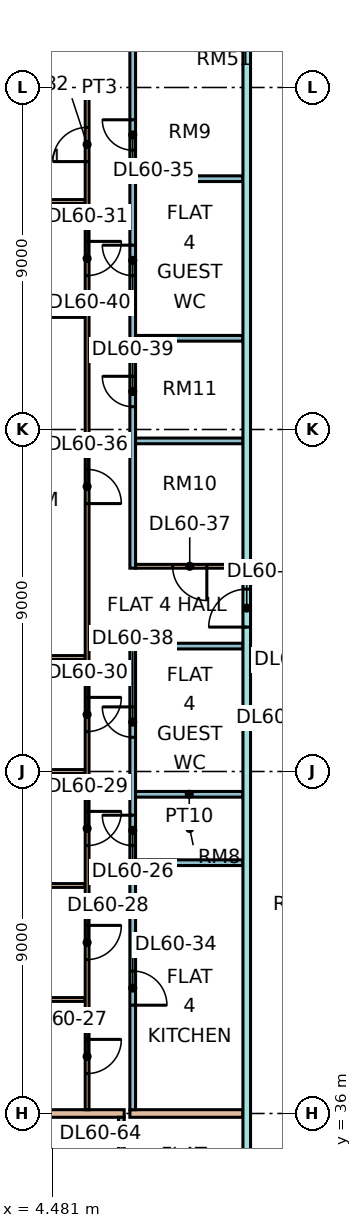
"""IFC4 building model, lengths in metres.
Left out: names, types, materials, properties, quantities, classifications, styles, units other than length and angle.
Written with IfcOpenShell. Run it as: python <this file> out.ifc"""

import sys

from ifc_helpers import new_model, si_unit, direction, frame, frame_2d, origin, place, context, subcontext, project, spatial, rectangle, extrude, element, fill, save


model = new_model("IFC4")
c1 = context("Model", 3, precision=1e-05, world=origin(), true_north=direction((0.0, 1.0)))
c2 = subcontext(c1, "Body", "Model", "MODEL_VIEW")
j1 = project(units=[si_unit("LENGTHUNIT", "METRE"), si_unit("PLANEANGLEUNIT", "RADIAN")], contexts=[c1])
p1 = place(None, origin())
s1 = spatial("IfcSite", under=j1, at=p1, CompositionType="ELEMENT")
p2 = place(p1, origin())
s2 = spatial("IfcBuilding", under=s1, at=p2, CompositionType="ELEMENT")
p3 = place(p2, frame((0.0, 0.0, 252.9)))
s3 = spatial("IfcBuildingStorey", under=s2, at=p3, CompositionType="ELEMENT", Elevation=252.9)
p4 = place(p3, frame((-1.351, 60.0, 0.0), z_axis=(0.0, 0.0, 1.0), x_axis=(1.0, 0.0, 0.0)))
e1 = element("IfcWall", 1, at=p4, inside=s3, PredefinedType="PARTITIONING", context=c2, shape_type="SweptSolid", body=[
    extrude(rectangle(XDim=6.701, YDim=0.1, at=frame_2d((3.351, 0.0))), origin(), (0.0, 0.0, 1.0), 3.3),
])
p5 = place(p3, frame((0.0, 36.0, 0.0), z_axis=(0.0, 0.0, 1.0), x_axis=(1.0, 0.0, 0.0)))
e2 = element("IfcWall", 2, at=p5, inside=s3, PredefinedType="PARTITIONING", context=c2, shape_type="SweptSolid", body=[
    extrude(rectangle(XDim=6.375, YDim=0.2, at=frame_2d((3.188, 0.0))), origin(), (0.0, 0.0, 1.0), 3.3),
])
p6 = place(p3, frame((0.0, 48.0, 0.0), z_axis=(0.0, 0.0, 1.0), x_axis=(1.0, 0.0, 0.0)))
e3 = element("IfcWall", 3, at=p6, inside=s3, PredefinedType="PARTITIONING", context=c2, shape_type="SweptSolid", body=[
    extrude(rectangle(XDim=5.35, YDim=0.1, at=frame_2d((2.675, 0.0))), origin(), (0.0, 0.0, 1.0), 3.3),
])
p7 = place(p3, frame((-1.35, 57.0, 0.0), z_axis=(0.0, 0.0, 1.0), x_axis=(1.0, 0.0, 0.0)))
e4 = element("IfcWall", 4, at=p7, inside=s3, PredefinedType="PARTITIONING", context=c2, shape_type="SweptSolid", body=[
    extrude(rectangle(XDim=6.7, YDim=0.1, at=frame_2d((3.35, 0.0))), origin(), (0.0, 0.0, 1.0), 3.3),
])
for number, where, z_axis, x_axis in (
    (5, (0.074, 39.0, 0.0), (0.0, 0.0, 1.0), (1.0, 0.0, 0.0)),
    (6, (0.074, 42.0, 0.0), (0.0, 0.0, 1.0), (1.0, 0.0, 0.0)),
    (7, (0.074, 45.0, 0.0), (0.0, 0.0, 1.0), (1.0, 0.0, 0.0)),
):
    element("IfcWall", number, at=place(p3, frame(where, z_axis=z_axis, x_axis=x_axis)), inside=s3, PredefinedType="PARTITIONING", context=c2, shape_type="SweptSolid", body=[
        extrude(rectangle(XDim=5.276, YDim=0.1, at=frame_2d((2.638, 0.0))), origin(), (0.0, 0.0, 1.0), 3.3),
    ])
p8 = place(p3, frame((5.4, 36.1, 0.0), z_axis=(0.0, 0.0, 1.0), x_axis=(0.0, 1.0, 0.0)))
e8 = element("IfcWall", 8, at=p8, inside=s3, PredefinedType="PARTITIONING", context=c2, shape_type="SweptSolid", body=[
    extrude(rectangle(XDim=26.95, YDim=0.1, at=frame_2d((13.475, 0.0))), origin(), (0.0, 0.0, 1.0), 3.3),
])
p9 = place(p8, frame((0.95, 0.0, 0.0)))
e9 = element("IfcOpeningElement", 9, at=p9, cuts=e8, PredefinedType="OPENING", context=c2, shape_type="SweptSolid", body=[
    extrude(rectangle(XDim=0.9, YDim=2.1, at=frame_2d((0.45, 1.05))), frame((0.0, 0.06, 0.0), z_axis=(0.0, -1.0, 0.0), x_axis=(1.0, 0.0, 0.0)), (0.0, 0.0, 1.0), 0.12),
])
p10 = place(p8, frame((3.95, 0.0, 0.0)))
e10 = element("IfcOpeningElement", 10, at=p10, cuts=e8, PredefinedType="OPENING", context=c2, shape_type="SweptSolid", body=[
    extrude(rectangle(XDim=0.9, YDim=2.1, at=frame_2d((0.45, 1.05))), frame((0.0, 0.06, 0.0), z_axis=(0.0, -1.0, 0.0), x_axis=(1.0, 0.0, 0.0)), (0.0, 0.0, 1.0), 0.12),
])
p11 = place(p8, frame((6.95, 0.0, 0.0)))
e11 = element("IfcOpeningElement", 11, at=p11, cuts=e8, PredefinedType="OPENING", context=c2, shape_type="SweptSolid", body=[
    extrude(rectangle(XDim=0.9, YDim=2.1, at=frame_2d((0.45, 1.05))), frame((0.0, 0.06, 0.0), z_axis=(0.0, -1.0, 0.0), x_axis=(1.0, 0.0, 0.0)), (0.0, 0.0, 1.0), 0.12),
])
p12 = place(p8, frame((9.95, 0.0, 0.0)))
e12 = element("IfcOpeningElement", 12, at=p12, cuts=e8, PredefinedType="OPENING", context=c2, shape_type="SweptSolid", body=[
    extrude(rectangle(XDim=0.9, YDim=2.1, at=frame_2d((0.45, 1.05))), frame((0.0, 0.06, 0.0), z_axis=(0.0, -1.0, 0.0), x_axis=(1.0, 0.0, 0.0)), (0.0, 0.0, 1.0), 0.12),
])
p13 = place(p8, frame((21.95, 0.0, 0.0)))
e13 = element("IfcOpeningElement", 13, at=p13, cuts=e8, PredefinedType="OPENING", context=c2, shape_type="SweptSolid", body=[
    extrude(rectangle(XDim=0.9, YDim=2.1, at=frame_2d((0.45, 1.05))), frame((0.0, 0.06, 0.0), z_axis=(0.0, -1.0, 0.0), x_axis=(1.0, 0.0, 0.0)), (0.0, 0.0, 1.0), 0.12),
])
p14 = place(p8, frame((24.95, 0.0, 0.0)))
e14 = element("IfcOpeningElement", 14, at=p14, cuts=e8, PredefinedType="OPENING", context=c2, shape_type="SweptSolid", body=[
    extrude(rectangle(XDim=0.9, YDim=2.1, at=frame_2d((0.45, 1.05))), frame((0.0, 0.06, 0.0), z_axis=(0.0, -1.0, 0.0), x_axis=(1.0, 0.0, 0.0)), (0.0, 0.0, 1.0), 0.12),
])
p15 = place(p8, frame((15.95, 0.0, 0.0)))
e15 = element("IfcOpeningElement", 15, at=p15, cuts=e8, PredefinedType="OPENING", context=c2, shape_type="SweptSolid", body=[
    extrude(rectangle(XDim=0.9, YDim=2.1, at=frame_2d((0.45, 1.05))), frame((0.0, 0.06, 0.0), z_axis=(0.0, -1.0, 0.0), x_axis=(1.0, 0.0, 0.0)), (0.0, 0.0, 1.0), 0.12),
])
p16 = place(p3, frame((5.45, 63.0, 0.0), z_axis=(0.0, 0.0, 1.0), x_axis=(1.0, 0.0, 0.0)))
e16 = element("IfcWall", 16, at=p16, inside=s3, PredefinedType="PARTITIONING", context=c2, shape_type="SweptSolid", body=[
    extrude(rectangle(XDim=0.55, YDim=0.1, at=frame_2d((0.275, 0.0))), origin(), (0.0, 0.0, 1.0), 3.3),
])
p17 = place(p3, frame((6.3, 26.325, 0.0), z_axis=(0.0, 0.0, 1.0), x_axis=(0.0, 1.0, 0.0)))
e17 = element("IfcWall", 17, at=p17, inside=s3, PredefinedType="PARTITIONING", context=c2, shape_type="SweptSolid", body=[
    extrude(rectangle(XDim=9.575, YDim=0.15, at=frame_2d((4.788, 0.0))), origin(), (0.0, 0.0, 1.0), 3.3),
])
p18 = place(p17, frame((4.575, 0.0, 0.0)))
e18 = element("IfcOpeningElement", 18, at=p18, cuts=e17, PredefinedType="OPENING", context=c2, shape_type="SweptSolid", body=[
    extrude(rectangle(XDim=0.8, YDim=2.1, at=frame_2d((0.4, 1.05))), frame((0.0, 0.085, 0.0), z_axis=(0.0, -1.0, 0.0), x_axis=(1.0, 0.0, 0.0)), (0.0, 0.0, 1.0), 0.17),
])
p19 = place(p17, frame((7.725, 0.0, 0.0)))
e19 = element("IfcOpeningElement", 19, at=p19, cuts=e17, PredefinedType="OPENING", context=c2, shape_type="SweptSolid", body=[
    extrude(rectangle(XDim=0.9, YDim=2.1, at=frame_2d((0.45, 1.05))), frame((0.0, 0.085, 0.0), z_axis=(0.0, -1.0, 0.0), x_axis=(1.0, 0.0, 0.0)), (0.0, 0.0, 1.0), 0.17),
])
p20 = place(p3, frame((6.525, 36.0, 0.0), z_axis=(0.0, 0.0, 1.0), x_axis=(1.0, 0.0, 0.0)))
e20 = element("IfcWall", 20, at=p20, inside=s3, PredefinedType="PARTITIONING", context=c2, shape_type="SweptSolid", body=[
    extrude(rectangle(XDim=2.975, YDim=0.2, at=frame_2d((1.488, 0.0))), origin(), (0.0, 0.0, 1.0), 3.3),
])
p21 = place(p3, frame((6.6, 36.1, 0.0), z_axis=(0.0, 0.0, 1.0), x_axis=(0.0, 1.0, 0.0)))
e21 = element("IfcWall", 21, at=p21, inside=s3, PredefinedType="PARTITIONING", context=c2, shape_type="SweptSolid", body=[
    extrude(rectangle(XDim=12.275, YDim=0.15, at=frame_2d((6.137, 0.0))), origin(), (0.0, 0.0, 1.0), 3.3),
])
p22 = place(p21, frame((6.95, 0.0, 0.0)))
e22 = element("IfcOpeningElement", 22, at=p22, cuts=e21, PredefinedType="OPENING", context=c2, shape_type="SweptSolid", body=[
    extrude(rectangle(XDim=0.8, YDim=2.1, at=frame_2d((0.4, 1.05))), frame((0.0, 0.085, 0.0), z_axis=(0.0, -1.0, 0.0), x_axis=(1.0, 0.0, 0.0)), (0.0, 0.0, 1.0), 0.17),
])
p23 = place(p21, frame((2.75, 0.0, 0.0)))
e23 = element("IfcOpeningElement", 23, at=p23, cuts=e21, PredefinedType="OPENING", context=c2, shape_type="SweptSolid", body=[
    extrude(rectangle(XDim=0.9, YDim=2.1, at=frame_2d((0.45, 1.05))), frame((0.0, 0.085, 0.0), z_axis=(0.0, -1.0, 0.0), x_axis=(1.0, 0.0, 0.0)), (0.0, 0.0, 1.0), 0.17),
])
p24 = place(p21, frame((9.8, 0.0, 0.0)))
e24 = element("IfcOpeningElement", 24, at=p24, cuts=e21, PredefinedType="OPENING", context=c2, shape_type="SweptSolid", body=[
    extrude(rectangle(XDim=0.8, YDim=2.1, at=frame_2d((0.4, 1.05))), frame((0.0, 0.085, 0.0), z_axis=(0.0, -1.0, 0.0), x_axis=(1.0, 0.0, 0.0)), (0.0, 0.0, 1.0), 0.17),
])
p25 = place(p3, frame((6.6, 50.35, 0.0), z_axis=(0.0, 0.0, 1.0), x_axis=(0.0, 1.0, 0.0)))
e25 = element("IfcWall", 25, at=p25, inside=s3, PredefinedType="PARTITIONING", context=c2, shape_type="SweptSolid", body=[
    extrude(rectangle(XDim=14.0, YDim=0.15, at=frame_2d((7.0, 0.0))), origin(), (0.0, 0.0, 1.0), 3.3),
])
p26 = place(p25, frame((11.0, 0.0, 0.0)))
e26 = element("IfcOpeningElement", 26, at=p26, cuts=e25, PredefinedType="OPENING", context=c2, shape_type="SweptSolid", body=[
    extrude(rectangle(XDim=0.8, YDim=2.1, at=frame_2d((0.4, 1.05))), frame((0.0, 0.085, 0.0), z_axis=(0.0, -1.0, 0.0), x_axis=(1.0, 0.0, 0.0)), (0.0, 0.0, 1.0), 0.17),
])
p27 = place(p25, frame((4.25, 0.0, 0.0)))
e27 = element("IfcOpeningElement", 27, at=p27, cuts=e25, PredefinedType="OPENING", context=c2, shape_type="SweptSolid", body=[
    extrude(rectangle(XDim=0.8, YDim=2.1, at=frame_2d((0.4, 1.05))), frame((0.0, 0.085, 0.0), z_axis=(0.0, -1.0, 0.0), x_axis=(1.0, 0.0, 0.0)), (0.0, 0.0, 1.0), 0.17),
])
p28 = place(p25, frame((7.7, 0.0, 0.0)))
e28 = element("IfcOpeningElement", 28, at=p28, cuts=e25, PredefinedType="OPENING", context=c2, shape_type="SweptSolid", body=[
    extrude(rectangle(XDim=0.8, YDim=2.1, at=frame_2d((0.4, 1.05))), frame((0.0, 0.085, 0.0), z_axis=(0.0, -1.0, 0.0), x_axis=(1.0, 0.0, 0.0)), (0.0, 0.0, 1.0), 0.17),
])
for number, where, z_axis, x_axis in (
    (29, (6.675, 42.6, 0.0), (0.0, 0.0, 1.0), (1.0, 0.0, 0.0)),
    (30, (6.675, 44.4, 0.0), (0.0, 0.0, 1.0), (1.0, 0.0, 0.0)),
    (31, (6.675, 48.3, 0.0), (0.0, 0.0, 1.0), (1.0, 0.0, 0.0)),
):
    element("IfcWall", number, at=place(p3, frame(where, z_axis=z_axis, x_axis=x_axis)), inside=s3, PredefinedType="PARTITIONING", context=c2, shape_type="SweptSolid", body=[
        extrude(rectangle(XDim=2.825, YDim=0.15, at=frame_2d((1.413, 0.0))), origin(), (0.0, 0.0, 1.0), 3.3),
    ])
p29 = place(p3, frame((6.675, 50.4, 0.0), z_axis=(0.0, 0.0, 1.0), x_axis=(1.0, 0.0, 0.0)))
e32 = element("IfcWall", 32, at=p29, inside=s3, PredefinedType="PARTITIONING", context=c2, shape_type="SweptSolid", body=[
    extrude(rectangle(XDim=2.825, YDim=0.1, at=frame_2d((1.413, 0.0))), origin(), (0.0, 0.0, 1.0), 3.3),
])
p30 = place(p29, frame((0.975, 0.0, 0.0)))
e33 = element("IfcOpeningElement", 33, at=p30, cuts=e32, PredefinedType="OPENING", context=c2, shape_type="SweptSolid", body=[
    extrude(rectangle(XDim=0.9, YDim=2.1, at=frame_2d((0.45, 1.05))), frame((0.0, 0.06, 0.0), z_axis=(0.0, -1.0, 0.0), x_axis=(1.0, 0.0, 0.0)), (0.0, 0.0, 1.0), 0.12),
])
for number, where, z_axis, x_axis in (
    (34, (6.675, 53.7, 0.0), (0.0, 0.0, 1.0), (1.0, 0.0, 0.0)),
    (35, (6.675, 56.4, 0.0), (0.0, 0.0, 1.0), (1.0, 0.0, 0.0)),
    (36, (6.675, 60.6, 0.0), (0.0, 0.0, 1.0), (1.0, 0.0, 0.0)),
):
    element("IfcWall", number, at=place(p3, frame(where, z_axis=z_axis, x_axis=x_axis)), inside=s3, PredefinedType="PARTITIONING", context=c2, shape_type="SweptSolid", body=[
        extrude(rectangle(XDim=2.825, YDim=0.15, at=frame_2d((1.413, 0.0))), origin(), (0.0, 0.0, 1.0), 3.3),
    ])
p31 = place(p3, frame((9.6, 20.0, 0.0), z_axis=(0.0, 0.0, 1.0), x_axis=(0.0, 1.0, 0.0)))
e37 = element("IfcWall", 37, at=p31, inside=s3, PredefinedType="PARTITIONING", context=c2, shape_type="SweptSolid", body=[
    extrude(rectangle(XDim=44.35, YDim=0.2, at=frame_2d((22.175, 0.0))), origin(), (0.0, 0.0, 1.0), 3.3),
])
p32 = place(p31, frame((28.8, 0.0, 0.0)))
e38 = element("IfcOpeningElement", 38, at=p32, cuts=e37, PredefinedType="OPENING", context=c2, shape_type="SweptSolid", body=[
    extrude(rectangle(XDim=1.0, YDim=2.1, at=frame_2d((0.5, 1.05))), frame((0.0, 0.11, 0.0), z_axis=(0.0, -1.0, 0.0), x_axis=(1.0, 0.0, 0.0)), (0.0, 0.0, 1.0), 0.22),
])
p33 = place(p31, frame((0.6, 0.0, 0.0)))
e39 = element("IfcOpeningElement", 39, at=p33, cuts=e37, PredefinedType="OPENING", context=c2, shape_type="SweptSolid", body=[
    extrude(rectangle(XDim=1.2, YDim=2.1, at=frame_2d((0.6, 1.05))), frame((0.0, 0.11, 0.0), z_axis=(0.0, -1.0, 0.0), x_axis=(1.0, 0.0, 0.0)), (0.0, 0.0, 1.0), 0.22),
])
p34 = place(p31, frame((3.9, 0.0, 0.0)))
e40 = element("IfcOpeningElement", 40, at=p34, cuts=e37, PredefinedType="OPENING", context=c2, shape_type="SweptSolid", body=[
    extrude(rectangle(XDim=1.0, YDim=2.1, at=frame_2d((0.5, 1.05))), frame((0.0, 0.11, 0.0), z_axis=(0.0, -1.0, 0.0), x_axis=(1.0, 0.0, 0.0)), (0.0, 0.0, 1.0), 0.22),
])
p35 = place(p22, frame((0.8, 0.0, 0.0), z_axis=(0.0, 0.0, 1.0), x_axis=(-1.0, 0.0, 0.0)))
e41 = element("IfcDoor", 41, at=p35, inside=s3, OperationType="SINGLE_SWING_RIGHT", PredefinedType="DOOR", context=c2, shape_type="SweptSolid", body=[
    extrude(rectangle(XDim=0.8, YDim=2.1, at=frame_2d((0.4, 1.05))), frame((0.0, 0.025, 0.0), z_axis=(0.0, -1.0, 0.0), x_axis=(1.0, 0.0, 0.0)), (0.0, 0.0, 1.0), 0.05),
])
fill(e22, e41)
p36 = place(p9, origin())
e42 = element("IfcDoor", 42, at=p36, inside=s3, OperationType="SINGLE_SWING_RIGHT", PredefinedType="DOOR", context=c2, shape_type="SweptSolid", body=[
    extrude(rectangle(XDim=0.9, YDim=2.1, at=frame_2d((0.45, 1.05))), frame((0.0, 0.025, 0.0), z_axis=(0.0, -1.0, 0.0), x_axis=(1.0, 0.0, 0.0)), (0.0, 0.0, 1.0), 0.05),
])
fill(e9, e42)
p37 = place(p10, origin())
e43 = element("IfcDoor", 43, at=p37, inside=s3, OperationType="SINGLE_SWING_RIGHT", PredefinedType="DOOR", context=c2, shape_type="SweptSolid", body=[
    extrude(rectangle(XDim=0.9, YDim=2.1, at=frame_2d((0.45, 1.05))), frame((0.0, 0.025, 0.0), z_axis=(0.0, -1.0, 0.0), x_axis=(1.0, 0.0, 0.0)), (0.0, 0.0, 1.0), 0.05),
])
fill(e10, e43)
p38 = place(p11, origin())
e44 = element("IfcDoor", 44, at=p38, inside=s3, OperationType="SINGLE_SWING_RIGHT", PredefinedType="DOOR", context=c2, shape_type="SweptSolid", body=[
    extrude(rectangle(XDim=0.9, YDim=2.1, at=frame_2d((0.45, 1.05))), frame((0.0, 0.025, 0.0), z_axis=(0.0, -1.0, 0.0), x_axis=(1.0, 0.0, 0.0)), (0.0, 0.0, 1.0), 0.05),
])
fill(e11, e44)
p39 = place(p12, origin())
e45 = element("IfcDoor", 45, at=p39, inside=s3, OperationType="SINGLE_SWING_RIGHT", PredefinedType="DOOR", context=c2, shape_type="SweptSolid", body=[
    extrude(rectangle(XDim=0.9, YDim=2.1, at=frame_2d((0.45, 1.05))), frame((0.0, 0.025, 0.0), z_axis=(0.0, -1.0, 0.0), x_axis=(1.0, 0.0, 0.0)), (0.0, 0.0, 1.0), 0.05),
])
fill(e12, e45)
p40 = place(p13, origin())
e46 = element("IfcDoor", 46, at=p40, inside=s3, OperationType="SINGLE_SWING_RIGHT", PredefinedType="DOOR", context=c2, shape_type="SweptSolid", body=[
    extrude(rectangle(XDim=0.9, YDim=2.1, at=frame_2d((0.45, 1.05))), frame((0.0, 0.025, 0.0), z_axis=(0.0, -1.0, 0.0), x_axis=(1.0, 0.0, 0.0)), (0.0, 0.0, 1.0), 0.05),
])
fill(e13, e46)
p41 = place(p14, origin())
e47 = element("IfcDoor", 47, at=p41, inside=s3, OperationType="SINGLE_SWING_LEFT", PredefinedType="DOOR", context=c2, shape_type="SweptSolid", body=[
    extrude(rectangle(XDim=0.9, YDim=2.1, at=frame_2d((0.45, 1.05))), frame((0.0, 0.025, 0.0), z_axis=(0.0, -1.0, 0.0), x_axis=(1.0, 0.0, 0.0)), (0.0, 0.0, 1.0), 0.05),
])
fill(e14, e47)
p42 = place(p32, origin())
e48 = element("IfcDoor", 48, at=p42, inside=s3, OperationType="SINGLE_SWING_LEFT", PredefinedType="DOOR", context=c2, shape_type="SweptSolid", body=[
    extrude(rectangle(XDim=1.0, YDim=2.1, at=frame_2d((0.5, 1.05))), frame((0.0, 0.025, 0.0), z_axis=(0.0, -1.0, 0.0), x_axis=(1.0, 0.0, 0.0)), (0.0, 0.0, 1.0), 0.05),
])
fill(e38, e48)
p43 = place(p23, frame((0.9, 0.0, 0.0), z_axis=(0.0, 0.0, 1.0), x_axis=(-1.0, 0.0, 0.0)))
e49 = element("IfcDoor", 49, at=p43, inside=s3, OperationType="SINGLE_SWING_LEFT", PredefinedType="DOOR", context=c2, shape_type="SweptSolid", body=[
    extrude(rectangle(XDim=0.9, YDim=2.1, at=frame_2d((0.45, 1.05))), frame((0.0, 0.025, 0.0), z_axis=(0.0, -1.0, 0.0), x_axis=(1.0, 0.0, 0.0)), (0.0, 0.0, 1.0), 0.05),
])
fill(e23, e49)
p44 = place(p26, frame((0.8, 0.0, 0.0), z_axis=(0.0, 0.0, 1.0), x_axis=(-1.0, 0.0, 0.0)))
e50 = element("IfcDoor", 50, at=p44, inside=s3, OperationType="SINGLE_SWING_RIGHT", PredefinedType="DOOR", context=c2, shape_type="SweptSolid", body=[
    extrude(rectangle(XDim=0.8, YDim=2.1, at=frame_2d((0.4, 1.05))), frame((0.0, 0.025, 0.0), z_axis=(0.0, -1.0, 0.0), x_axis=(1.0, 0.0, 0.0)), (0.0, 0.0, 1.0), 0.05),
])
fill(e26, e50)
p45 = place(p15, frame((0.9, 0.0, 0.0), z_axis=(0.0, 0.0, 1.0), x_axis=(-1.0, 0.0, 0.0)))
e51 = element("IfcDoor", 51, at=p45, inside=s3, OperationType="SINGLE_SWING_LEFT", PredefinedType="DOOR", context=c2, shape_type="SweptSolid", body=[
    extrude(rectangle(XDim=0.9, YDim=2.1, at=frame_2d((0.45, 1.05))), frame((0.0, 0.025, 0.0), z_axis=(0.0, -1.0, 0.0), x_axis=(1.0, 0.0, 0.0)), (0.0, 0.0, 1.0), 0.05),
])
fill(e15, e51)
p46 = place(p30, origin())
e52 = element("IfcDoor", 52, at=p46, inside=s3, OperationType="SINGLE_SWING_RIGHT", PredefinedType="DOOR", context=c2, shape_type="SweptSolid", body=[
    extrude(rectangle(XDim=0.9, YDim=2.1, at=frame_2d((0.45, 1.05))), frame((0.0, 0.025, 0.0), z_axis=(0.0, -1.0, 0.0), x_axis=(1.0, 0.0, 0.0)), (0.0, 0.0, 1.0), 0.05),
])
fill(e33, e52)
p47 = place(p24, frame((0.8, 0.0, 0.0), z_axis=(0.0, 0.0, 1.0), x_axis=(-1.0, 0.0, 0.0)))
e53 = element("IfcDoor", 53, at=p47, inside=s3, OperationType="SINGLE_SWING_RIGHT", PredefinedType="DOOR", context=c2, shape_type="SweptSolid", body=[
    extrude(rectangle(XDim=0.8, YDim=2.1, at=frame_2d((0.4, 1.05))), frame((0.0, 0.025, 0.0), z_axis=(0.0, -1.0, 0.0), x_axis=(1.0, 0.0, 0.0)), (0.0, 0.0, 1.0), 0.05),
])
fill(e24, e53)
p48 = place(p27, frame((0.8, 0.0, 0.0), z_axis=(0.0, 0.0, 1.0), x_axis=(-1.0, 0.0, 0.0)))
e54 = element("IfcDoor", 54, at=p48, inside=s3, OperationType="SINGLE_SWING_RIGHT", PredefinedType="DOOR", context=c2, shape_type="SweptSolid", body=[
    extrude(rectangle(XDim=0.8, YDim=2.1, at=frame_2d((0.4, 1.05))), frame((0.0, 0.025, 0.0), z_axis=(0.0, -1.0, 0.0), x_axis=(1.0, 0.0, 0.0)), (0.0, 0.0, 1.0), 0.05),
])
fill(e27, e54)
p49 = place(p28, frame((0.8, 0.0, 0.0), z_axis=(0.0, 0.0, 1.0), x_axis=(-1.0, 0.0, 0.0)))
e55 = element("IfcDoor", 55, at=p49, inside=s3, OperationType="SINGLE_SWING_RIGHT", PredefinedType="DOOR", context=c2, shape_type="SweptSolid", body=[
    extrude(rectangle(XDim=0.8, YDim=2.1, at=frame_2d((0.4, 1.05))), frame((0.0, 0.025, 0.0), z_axis=(0.0, -1.0, 0.0), x_axis=(1.0, 0.0, 0.0)), (0.0, 0.0, 1.0), 0.05),
])
fill(e28, e55)
save(model, sys.argv[1])
